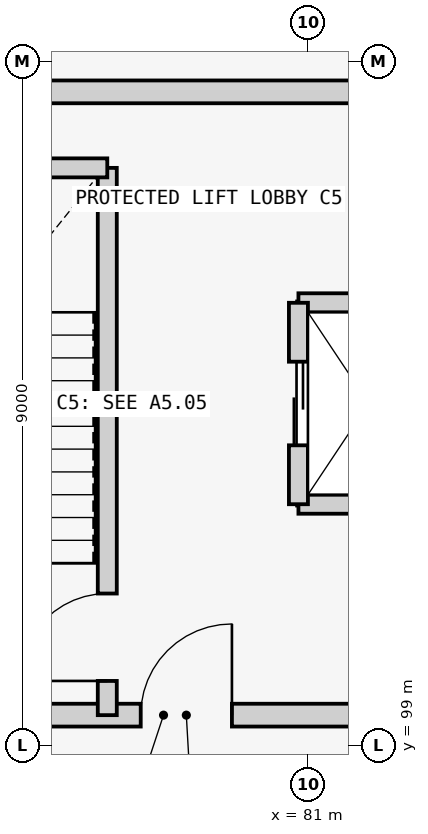
"""IFC4 building model, lengths in metres.
Left out: names, types, materials, properties, quantities, classifications, styles, units other than length and angle.
Written with IfcOpenShell. Run it as: python <this file> out.ifc"""

import sys

from ifc_helpers import new_model, si_unit, direction, frame, frame_2d, origin, place, context, subcontext, project, spatial, rectangle, extrude, element, fill, save


model = new_model("IFC4")
c1 = context("Model", 3, precision=1e-05, world=origin(), true_north=direction((0.0, 1.0)))
c2 = subcontext(c1, "Body", "Model", "MODEL_VIEW")
j1 = project(units=[si_unit("LENGTHUNIT", "METRE"), si_unit("PLANEANGLEUNIT", "RADIAN")], contexts=[c1])
p1 = place(None, origin())
s1 = spatial("IfcSite", under=j1, at=p1, CompositionType="ELEMENT")
p2 = place(p1, origin())
s2 = spatial("IfcBuilding", under=s1, at=p2, CompositionType="ELEMENT")
p3 = place(p2, origin())
s3 = spatial("IfcBuildingStorey", under=s2, at=p3, CompositionType="ELEMENT", Elevation=0.0)
p4 = place(p3, frame((74.0, 99.4, 0.0), z_axis=(0.0, 0.0, 1.0), x_axis=(1.0, 0.0, 0.0)))
e1 = element("IfcWall", 1, at=p4, inside=s3, PredefinedType="SHEAR", context=c2, shape_type="SweptSolid", body=[
    extrude(rectangle(XDim=10.2, YDim=0.3, at=frame_2d((5.1, 0.0))), origin(), (0.0, 0.0, 1.0), 3.95),
])
p5 = place(p4, frame((4.8, 0.0, 0.0)))
e2 = element("IfcOpeningElement", 2, at=p5, cuts=e1, PredefinedType="OPENING", context=c2, shape_type="SweptSolid", body=[
    extrude(rectangle(XDim=1.2, YDim=2.15, at=frame_2d((0.6, 1.075))), frame((0.0, 0.16, 0.0), z_axis=(0.0, -1.0, 0.0), x_axis=(1.0, 0.0, 0.0)), (0.0, 0.0, 1.0), 0.32),
])
p6 = place(p3, frame((84.2, 107.6, 0.0), z_axis=(0.0, 0.0, 1.0), x_axis=(-1.0, 0.0, 0.0)))
e3 = element("IfcWall", 3, at=p6, inside=s3, PredefinedType="SHEAR", context=c2, shape_type="SweptSolid", body=[
    extrude(rectangle(XDim=10.2, YDim=0.3, at=frame_2d((5.1, 0.0))), origin(), (0.0, 0.0, 1.0), 3.95),
])
p7 = place(p3, frame((78.36, 99.4, 0.0), z_axis=(0.0, 0.0, 1.0), x_axis=(0.0, 1.0, 0.0)))
e4 = element("IfcWall", 4, at=p7, inside=s3, PredefinedType="SHEAR", context=c2, shape_type="SweptSolid", body=[
    extrude(rectangle(XDim=7.2, YDim=0.25, at=frame_2d((3.6, 0.0))), origin(), (0.0, 0.0, 1.0), 3.95),
])
p8 = place(p7, frame((0.45, 0.0, 0.0)))
e5 = element("IfcOpeningElement", 5, at=p8, cuts=e4, PredefinedType="OPENING", context=c2, shape_type="SweptSolid", body=[
    extrude(rectangle(XDim=1.15, YDim=2.15, at=frame_2d((0.575, 1.075))), frame((0.0, 0.135, 0.0), z_axis=(0.0, -1.0, 0.0), x_axis=(1.0, 0.0, 0.0)), (0.0, 0.0, 1.0), 0.27),
])
p9 = place(p3, frame((74.0, 106.6, 0.0), z_axis=(0.0, 0.0, 1.0), x_axis=(1.0, 0.0, 0.0)))
e6 = element("IfcWall", 6, at=p9, inside=s3, PredefinedType="SHEAR", context=c2, shape_type="SweptSolid", body=[
    extrude(rectangle(XDim=4.36, YDim=0.25, at=frame_2d((2.18, 0.0))), origin(), (0.0, 0.0, 1.0), 3.95),
])
for number, where, z_axis, x_axis in (
    (7, (80.875, 102.175, 0.0), (0.0, 0.0, 1.0), (1.0, 0.0, 0.0)),
    (8, (80.875, 104.825, 0.0), (0.0, 0.0, 1.0), (1.0, 0.0, 0.0)),
):
    element("IfcWall", number, at=place(p3, frame(where, z_axis=z_axis, x_axis=x_axis)), inside=s3, PredefinedType="SHEAR", context=c2, shape_type="SweptSolid", body=[
        extrude(rectangle(XDim=1.85, YDim=0.25, at=frame_2d((0.925, 0.0))), origin(), (0.0, 0.0, 1.0), 3.95),
    ])
p10 = place(p3, frame((80.875, 102.175, 0.0), z_axis=(0.0, 0.0, 1.0), x_axis=(0.0, 1.0, 0.0)))
e9 = element("IfcWall", 9, at=p10, inside=s3, PredefinedType="SHEAR", context=c2, shape_type="SweptSolid", body=[
    extrude(rectangle(XDim=2.65, YDim=0.25, at=frame_2d((1.325, 0.0))), origin(), (0.0, 0.0, 1.0), 3.95),
])
p11 = place(p10, frame((0.775, 0.0, 0.0)))
e10 = element("IfcOpeningElement", 10, at=p11, cuts=e9, PredefinedType="OPENING", context=c2, shape_type="SweptSolid", body=[
    extrude(rectangle(XDim=1.1, YDim=2.15, at=frame_2d((0.55, 1.075))), frame((0.0, 0.135, 0.0), z_axis=(0.0, -1.0, 0.0), x_axis=(1.0, 0.0, 0.0)), (0.0, 0.0, 1.0), 0.27),
])
p12 = place(p8, origin())
e11 = element("IfcDoor", 11, at=p12, inside=s3, OperationType="SINGLE_SWING_LEFT", PredefinedType="DOOR", context=c2, shape_type="SweptSolid", body=[
    extrude(rectangle(XDim=1.15, YDim=2.15, at=frame_2d((0.575, 1.075))), frame((0.0, 0.025, 0.0), z_axis=(0.0, -1.0, 0.0), x_axis=(1.0, 0.0, 0.0)), (0.0, 0.0, 1.0), 0.05),
])
fill(e5, e11)
p13 = place(p5, origin())
e12 = element("IfcDoor", 12, at=p13, inside=s3, OperationType="SINGLE_SWING_RIGHT", PredefinedType="DOOR", context=c2, shape_type="SweptSolid", body=[
    extrude(rectangle(XDim=1.2, YDim=2.15, at=frame_2d((0.6, 1.075))), frame((0.0, 0.025, 0.0), z_axis=(0.0, -1.0, 0.0), x_axis=(1.0, 0.0, 0.0)), (0.0, 0.0, 1.0), 0.05),
])
fill(e2, e12)
p14 = place(p11, origin())
e13 = element("IfcDoor", 13, at=p14, inside=s3, OperationType="DOUBLE_DOOR_SLIDING", PredefinedType="USERDEFINED", context=c2, shape_type="SweptSolid", body=[
    extrude(rectangle(XDim=1.1, YDim=2.15, at=frame_2d((0.55, 1.075))), frame((0.0, 0.025, 0.0), z_axis=(0.0, -1.0, 0.0), x_axis=(1.0, 0.0, 0.0)), (0.0, 0.0, 1.0), 0.05),
])
fill(e10, e13)
save(model, sys.argv[1])
